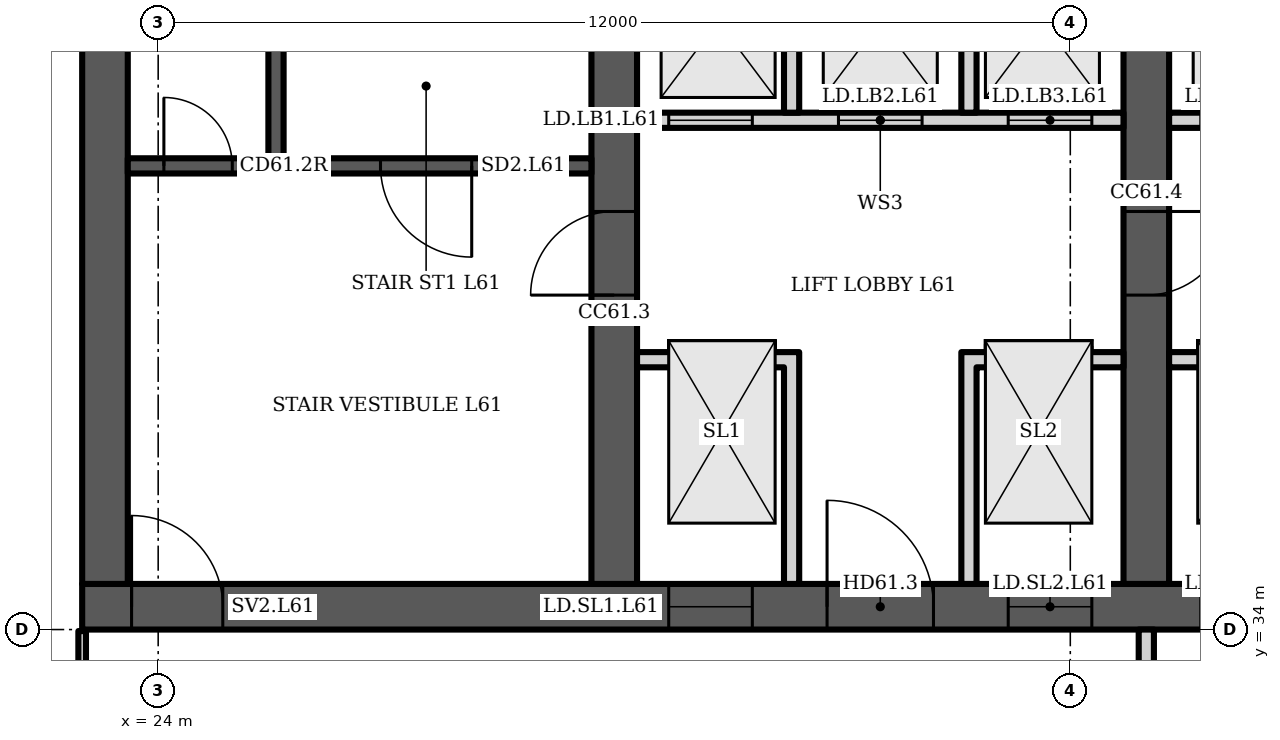
"""IFC4 building model, lengths in metres.
Left out: names, types, materials, properties, quantities, classifications, styles, units other than length and angle.
Written with IfcOpenShell. Run it as: python <this file> out.ifc"""

import sys

from ifc_helpers import new_model, si_unit, direction, frame, frame_2d, origin, place, context, subcontext, project, spatial, polyline, rectangle, outline, extrude, element, fill, save


model = new_model("IFC4")
c1 = context("Model", 3, precision=1e-05, world=origin(), true_north=direction((0.0, 1.0)))
c2 = subcontext(c1, "Body", "Model", "MODEL_VIEW")
j1 = project(units=[si_unit("LENGTHUNIT", "METRE"), si_unit("PLANEANGLEUNIT", "RADIAN")], contexts=[c1])
p1 = place(None, origin())
s1 = spatial("IfcSite", under=j1, at=p1, CompositionType="ELEMENT")
p2 = place(p1, origin())
s2 = spatial("IfcBuilding", under=s1, at=p2, CompositionType="ELEMENT")
p3 = place(p2, frame((0.0, 0.0, 243.1)))
s3 = spatial("IfcBuildingStorey", under=s2, at=p3, CompositionType="ELEMENT", Elevation=243.1)
p4 = place(p3, frame((23.0, 34.3, 0.0), z_axis=(0.0, 0.0, 1.0), x_axis=(1.0, 0.0, 0.0)))
e1 = element("IfcWall", 1, at=p4, inside=s3, PredefinedType="SHEAR", context=c2, shape_type="SweptSolid", body=[
    extrude(rectangle(XDim=35.0, YDim=0.6, at=frame_2d((17.5, 0.0))), origin(), (0.0, 0.0, 1.0), 3.6),
])
p5 = place(p4, frame((0.65, 0.0, 0.0)))
e2 = element("IfcOpeningElement", 2, at=p5, cuts=e1, PredefinedType="OPENING", context=c2, shape_type="SweptSolid", body=[
    extrude(rectangle(XDim=1.2, YDim=2.1, at=frame_2d((0.6, 1.05))), frame((0.0, 0.31, 0.0), z_axis=(0.0, -1.0, 0.0), x_axis=(1.0, 0.0, 0.0)), (0.0, 0.0, 1.0), 0.62),
])
p6 = place(p4, frame((7.717, 0.0, 0.0)))
e3 = element("IfcOpeningElement", 3, at=p6, cuts=e1, PredefinedType="OPENING", context=c2, shape_type="SweptSolid", body=[
    extrude(rectangle(XDim=1.1, YDim=2.1, at=frame_2d((0.55, 1.05))), frame((0.0, 0.31, 0.0), z_axis=(0.0, -1.0, 0.0), x_axis=(1.0, 0.0, 0.0)), (0.0, 0.0, 1.0), 0.62),
])
p7 = place(p4, frame((12.183, 0.0, 0.0)))
e4 = element("IfcOpeningElement", 4, at=p7, cuts=e1, PredefinedType="OPENING", context=c2, shape_type="SweptSolid", body=[
    extrude(rectangle(XDim=1.1, YDim=2.1, at=frame_2d((0.55, 1.05))), frame((0.0, 0.31, 0.0), z_axis=(0.0, -1.0, 0.0), x_axis=(1.0, 0.0, 0.0)), (0.0, 0.0, 1.0), 0.62),
])
p8 = place(p4, frame((9.8, 0.0, 0.0)))
e5 = element("IfcOpeningElement", 5, at=p8, cuts=e1, PredefinedType="OPENING", context=c2, shape_type="SweptSolid", body=[
    extrude(rectangle(XDim=1.4, YDim=2.1, at=frame_2d((0.7, 1.05))), frame((0.0, 0.31, 0.0), z_axis=(0.0, -1.0, 0.0), x_axis=(1.0, 0.0, 0.0)), (0.0, 0.0, 1.0), 0.62),
])
p9 = place(p4, frame((14.717, 0.0, 0.0)))
e6 = element("IfcOpeningElement", 6, at=p9, cuts=e1, PredefinedType="OPENING", context=c2, shape_type="SweptSolid", body=[
    extrude(rectangle(XDim=1.1, YDim=2.1, at=frame_2d((0.55, 1.05))), frame((0.0, 0.31, 0.0), z_axis=(0.0, -1.0, 0.0), x_axis=(1.0, 0.0, 0.0)), (0.0, 0.0, 1.0), 0.62),
])
p10 = place(p4, frame((16.95, 0.0, 0.0)))
e7 = element("IfcOpeningElement", 7, at=p10, cuts=e1, PredefinedType="OPENING", context=c2, shape_type="SweptSolid", body=[
    extrude(rectangle(XDim=1.1, YDim=2.1, at=frame_2d((0.55, 1.05))), frame((0.0, 0.31, 0.0), z_axis=(0.0, -1.0, 0.0), x_axis=(1.0, 0.0, 0.0)), (0.0, 0.0, 1.0), 0.62),
])
p11 = place(p4, frame((19.183, 0.0, 0.0)))
e8 = element("IfcOpeningElement", 8, at=p11, cuts=e1, PredefinedType="OPENING", context=c2, shape_type="SweptSolid", body=[
    extrude(rectangle(XDim=1.1, YDim=2.1, at=frame_2d((0.55, 1.05))), frame((0.0, 0.31, 0.0), z_axis=(0.0, -1.0, 0.0), x_axis=(1.0, 0.0, 0.0)), (0.0, 0.0, 1.0), 0.62),
])
p12 = place(p4, frame((26.15, 0.0, 0.0)))
e9 = element("IfcOpeningElement", 9, at=p12, cuts=e1, PredefinedType="OPENING", context=c2, shape_type="SweptSolid", body=[
    extrude(rectangle(XDim=1.2, YDim=2.1, at=frame_2d((0.6, 1.05))), frame((0.0, 0.31, 0.0), z_axis=(0.0, -1.0, 0.0), x_axis=(1.0, 0.0, 0.0)), (0.0, 0.0, 1.0), 0.62),
])
p13 = place(p4, frame((28.767, 0.0, 0.0)))
e10 = element("IfcOpeningElement", 10, at=p13, cuts=e1, PredefinedType="OPENING", context=c2, shape_type="SweptSolid", body=[
    extrude(rectangle(XDim=1.0, YDim=2.1, at=frame_2d((0.5, 1.05))), frame((0.0, 0.31, 0.0), z_axis=(0.0, -1.0, 0.0), x_axis=(1.0, 0.0, 0.0)), (0.0, 0.0, 1.0), 0.62),
])
p14 = place(p4, frame((33.083, 0.0, 0.0)))
e11 = element("IfcOpeningElement", 11, at=p14, cuts=e1, PredefinedType="OPENING", context=c2, shape_type="SweptSolid", body=[
    extrude(rectangle(XDim=1.0, YDim=2.1, at=frame_2d((0.5, 1.05))), frame((0.0, 0.31, 0.0), z_axis=(0.0, -1.0, 0.0), x_axis=(1.0, 0.0, 0.0)), (0.0, 0.0, 1.0), 0.62),
])
p15 = place(p4, frame((30.8, 0.0, 0.0)))
e12 = element("IfcOpeningElement", 12, at=p15, cuts=e1, PredefinedType="OPENING", context=c2, shape_type="SweptSolid", body=[
    extrude(rectangle(XDim=1.4, YDim=2.1, at=frame_2d((0.7, 1.05))), frame((0.0, 0.31, 0.0), z_axis=(0.0, -1.0, 0.0), x_axis=(1.0, 0.0, 0.0)), (0.0, 0.0, 1.0), 0.62),
])
p16 = place(p3, frame((23.3, 34.6, 0.0), z_axis=(0.0, 0.0, 1.0), x_axis=(0.0, 1.0, 0.0)))
e13 = element("IfcWall", 13, at=p16, inside=s3, PredefinedType="SHEAR", context=c2, shape_type="SweptSolid", body=[
    extrude(rectangle(XDim=13.585, YDim=0.6, at=frame_2d((6.792, 0.0))), origin(), (0.0, 0.0, 1.0), 3.6),
])
p17 = place(p3, frame((30.0, 34.6, 0.0), z_axis=(0.0, 0.0, 1.0), x_axis=(0.0, 1.0, 0.0)))
e14 = element("IfcWall", 14, at=p17, inside=s3, PredefinedType="SHEAR", context=c2, shape_type="SweptSolid", body=[
    extrude(rectangle(XDim=14.171, YDim=0.6, at=frame_2d((7.085, 0.0))), origin(), (0.0, 0.0, 1.0), 3.6),
])
p18 = place(p17, frame((3.8, 0.0, 0.0)))
e15 = element("IfcOpeningElement", 15, at=p18, cuts=e14, PredefinedType="OPENING", context=c2, shape_type="SweptSolid", body=[
    extrude(rectangle(XDim=1.1, YDim=2.1, at=frame_2d((0.55, 1.05))), frame((0.0, 0.31, 0.0), z_axis=(0.0, -1.0, 0.0), x_axis=(1.0, 0.0, 0.0)), (0.0, 0.0, 1.0), 0.62),
])
p19 = place(p3, frame((37.0, 34.6, 0.0), z_axis=(0.0, 0.0, 1.0), x_axis=(0.0, 1.0, 0.0)))
e16 = element("IfcWall", 16, at=p19, inside=s3, PredefinedType="SHEAR", context=c2, shape_type="SweptSolid", body=[
    extrude(rectangle(XDim=14.784, YDim=0.6, at=frame_2d((7.392, 0.0))), origin(), (0.0, 0.0, 1.0), 3.6),
])
p20 = place(p19, frame((11.302, 0.0, 0.0)))
e17 = element("IfcOpeningElement", 17, at=p20, cuts=e16, PredefinedType="OPENING", context=c2, shape_type="SweptSolid", body=[
    extrude(rectangle(XDim=1.0, YDim=2.1, at=frame_2d((0.5, 1.05))), frame((0.0, 0.31, 0.0), z_axis=(0.0, -1.0, 0.0), x_axis=(1.0, 0.0, 0.0)), (0.0, 0.0, 1.0), 0.62),
])
p21 = place(p19, frame((3.8, 0.0, 0.0)))
e18 = element("IfcOpeningElement", 18, at=p21, cuts=e16, PredefinedType="OPENING", context=c2, shape_type="SweptSolid", body=[
    extrude(rectangle(XDim=1.1, YDim=2.1, at=frame_2d((0.55, 1.05))), frame((0.0, 0.31, 0.0), z_axis=(0.0, -1.0, 0.0), x_axis=(1.0, 0.0, 0.0)), (0.0, 0.0, 1.0), 0.62),
])
p22 = place(p3, frame((23.6, 40.1, 0.0), z_axis=(0.0, 0.0, 1.0), x_axis=(1.0, 0.0, 0.0)))
e19 = element("IfcWall", 19, at=p22, inside=s3, PredefinedType="SHEAR", context=c2, shape_type="SweptSolid", body=[
    extrude(rectangle(XDim=6.1, YDim=0.2, at=frame_2d((3.05, 0.0))), origin(), (0.0, 0.0, 1.0), 3.2),
])
p23 = place(p22, frame((3.325, 0.0, 0.0)))
e20 = element("IfcOpeningElement", 20, at=p23, cuts=e19, PredefinedType="OPENING", context=c2, shape_type="SweptSolid", body=[
    extrude(rectangle(XDim=1.2, YDim=2.1, at=frame_2d((0.6, 1.05))), frame((0.0, 0.11, 0.0), z_axis=(0.0, -1.0, 0.0), x_axis=(1.0, 0.0, 0.0)), (0.0, 0.0, 1.0), 0.22),
])
p24 = place(p22, frame((0.475, 0.0, 0.0)))
e21 = element("IfcOpeningElement", 21, at=p24, cuts=e19, PredefinedType="OPENING", context=c2, shape_type="SweptSolid", body=[
    extrude(rectangle(XDim=0.9, YDim=2.1, at=frame_2d((0.45, 1.05))), frame((0.0, 0.11, 0.0), z_axis=(0.0, -1.0, 0.0), x_axis=(1.0, 0.0, 0.0)), (0.0, 0.0, 1.0), 0.22),
])
p25 = place(p3, frame((25.55, 40.2, 0.0), z_axis=(0.0, 0.0, 1.0), x_axis=(0.0, 1.0, 0.0)))
e22 = element("IfcWall", 22, at=p25, inside=s3, PredefinedType="SHEAR", context=c2, shape_type="SweptSolid", body=[
    extrude(rectangle(XDim=7.2, YDim=0.2, at=frame_2d((3.6, 0.0))), origin(), (0.0, 0.0, 1.0), 3.2),
])
p26 = place(p3, frame((30.3, 40.7, 0.0), z_axis=(0.0, 0.0, 1.0), x_axis=(1.0, 0.0, 0.0)))
e23 = element("IfcWall", 23, at=p26, inside=s3, PredefinedType="PARTITIONING", context=c2, shape_type="SweptSolid", body=[
    extrude(rectangle(XDim=6.4, YDim=0.2, at=frame_2d((3.2, 0.0))), origin(), (0.0, 0.0, 1.0), 3.2),
])
p27 = place(p26, frame((0.417, 0.0, 0.0)))
e24 = element("IfcOpeningElement", 24, at=p27, cuts=e23, PredefinedType="OPENING", context=c2, shape_type="SweptSolid", body=[
    extrude(rectangle(XDim=1.1, YDim=2.1, at=frame_2d((0.55, 1.05))), frame((0.0, 0.11, 0.0), z_axis=(0.0, -1.0, 0.0), x_axis=(1.0, 0.0, 0.0)), (0.0, 0.0, 1.0), 0.22),
])
p28 = place(p26, frame((2.65, 0.0, 0.0)))
e25 = element("IfcOpeningElement", 25, at=p28, cuts=e23, PredefinedType="OPENING", context=c2, shape_type="SweptSolid", body=[
    extrude(rectangle(XDim=1.1, YDim=2.1, at=frame_2d((0.55, 1.05))), frame((0.0, 0.11, 0.0), z_axis=(0.0, -1.0, 0.0), x_axis=(1.0, 0.0, 0.0)), (0.0, 0.0, 1.0), 0.22),
])
p29 = place(p26, frame((4.883, 0.0, 0.0)))
e26 = element("IfcOpeningElement", 26, at=p29, cuts=e23, PredefinedType="OPENING", context=c2, shape_type="SweptSolid", body=[
    extrude(rectangle(XDim=1.1, YDim=2.1, at=frame_2d((0.55, 1.05))), frame((0.0, 0.11, 0.0), z_axis=(0.0, -1.0, 0.0), x_axis=(1.0, 0.0, 0.0)), (0.0, 0.0, 1.0), 0.22),
])
p30 = place(p3, frame((0.0, 0.0, -0.0)))
e27 = element("IfcWall", 27, at=p30, inside=s3, PredefinedType="PARTITIONING", context=c2, shape_type="SweptSolid", body=[
    extrude(outline(polyline([(32.233, 37.45), (30.3, 37.45), (30.3, 37.65), (32.233, 37.65), (32.433, 37.65), (32.433, 34.6), (32.233, 34.6), (32.233, 37.45)])), origin(), (0.0, 0.0, 1.0), 3.2),
])
p31 = place(p3, frame((0.0, 0.0, -0.0)))
e28 = element("IfcWall", 28, at=p31, inside=s3, PredefinedType="PARTITIONING", context=c2, shape_type="SweptSolid", body=[
    extrude(outline(polyline([(34.567, 37.65), (34.767, 37.65), (36.7, 37.65), (36.7, 37.45), (34.767, 37.45), (34.767, 34.6), (34.567, 34.6), (34.567, 37.65)])), origin(), (0.0, 0.0, 1.0), 3.2),
])
p32 = place(p3, frame((0.0, 0.0, -0.0)))
e29 = element("IfcWall", 29, at=p32, inside=s3, PredefinedType="PARTITIONING", context=c2, shape_type="SweptSolid", body=[
    extrude(outline(polyline([(32.433, 40.8), (32.233, 40.8), (32.233, 43.8), (30.3, 43.8), (30.3, 44.0), (36.7, 44.0), (36.7, 43.8), (34.767, 43.8), (34.767, 40.8), (34.567, 40.8), (34.567, 43.8), (32.433, 43.8), (32.433, 40.8)])), origin(), (0.0, 0.0, 1.0), 3.2),
])
p33 = place(p3, frame((37.3, 40.7, 0.0), z_axis=(0.0, 0.0, 1.0), x_axis=(1.0, 0.0, 0.0)))
e30 = element("IfcWall", 30, at=p33, inside=s3, PredefinedType="PARTITIONING", context=c2, shape_type="SweptSolid", body=[
    extrude(rectangle(XDim=6.4, YDim=0.2, at=frame_2d((3.2, 0.0))), origin(), (0.0, 0.0, 1.0), 3.2),
])
p34 = place(p33, frame((0.417, 0.0, 0.0)))
e31 = element("IfcOpeningElement", 31, at=p34, cuts=e30, PredefinedType="OPENING", context=c2, shape_type="SweptSolid", body=[
    extrude(rectangle(XDim=1.1, YDim=2.1, at=frame_2d((0.55, 1.05))), frame((0.0, 0.11, 0.0), z_axis=(0.0, -1.0, 0.0), x_axis=(1.0, 0.0, 0.0)), (0.0, 0.0, 1.0), 0.22),
])
p35 = place(p33, frame((2.65, 0.0, 0.0)))
e32 = element("IfcOpeningElement", 32, at=p35, cuts=e30, PredefinedType="OPENING", context=c2, shape_type="SweptSolid", body=[
    extrude(rectangle(XDim=1.1, YDim=2.1, at=frame_2d((0.55, 1.05))), frame((0.0, 0.11, 0.0), z_axis=(0.0, -1.0, 0.0), x_axis=(1.0, 0.0, 0.0)), (0.0, 0.0, 1.0), 0.22),
])
p36 = place(p33, frame((4.883, 0.0, 0.0)))
e33 = element("IfcOpeningElement", 33, at=p36, cuts=e30, PredefinedType="OPENING", context=c2, shape_type="SweptSolid", body=[
    extrude(rectangle(XDim=1.1, YDim=2.1, at=frame_2d((0.55, 1.05))), frame((0.0, 0.11, 0.0), z_axis=(0.0, -1.0, 0.0), x_axis=(1.0, 0.0, 0.0)), (0.0, 0.0, 1.0), 0.22),
])
p37 = place(p3, frame((0.0, 0.0, -0.0)))
e34 = element("IfcWall", 34, at=p37, inside=s3, PredefinedType="PARTITIONING", context=c2, shape_type="SweptSolid", body=[
    extrude(outline(polyline([(41.567, 37.1), (39.433, 37.1), (39.433, 34.6), (39.233, 34.6), (39.233, 37.45), (37.3, 37.45), (37.3, 37.65), (39.233, 37.65), (39.433, 37.65), (39.433, 37.3), (41.567, 37.3), (41.567, 37.35), (41.767, 37.35), (43.7, 37.35), (43.7, 37.15), (41.767, 37.15), (41.767, 34.6), (41.567, 34.6), (41.567, 37.1)])), origin(), (0.0, 0.0, 1.0), 3.2),
])
p38 = place(p3, frame((0.0, 0.0, -0.0)))
e35 = element("IfcWall", 35, at=p38, inside=s3, PredefinedType="PARTITIONING", context=c2, shape_type="SweptSolid", body=[
    extrude(outline(polyline([(39.433, 40.8), (39.233, 40.8), (39.233, 43.8), (37.3, 43.8), (37.3, 44.0), (43.7, 44.0), (43.7, 43.8), (41.767, 43.8), (41.767, 40.8), (41.567, 40.8), (41.567, 43.8), (39.433, 43.8), (39.433, 40.8)])), origin(), (0.0, 0.0, 1.0), 3.2),
])
p39 = place(p3, frame((37.0, 30.5, 0.0), z_axis=(0.0, 0.0, 1.0), x_axis=(0.0, 1.0, 0.0)))
e36 = element("IfcWall", 36, at=p39, inside=s3, PredefinedType="PARTITIONING", context=c2, shape_type="SweptSolid", body=[
    extrude(rectangle(XDim=3.5, YDim=0.2, at=frame_2d((1.75, 0.0))), origin(), (0.0, 0.0, 1.0), 3.2),
])
p40 = place(p39, frame((1.2, 0.0, 0.0)))
e37 = element("IfcOpeningElement", 37, at=p40, cuts=e36, PredefinedType="OPENING", context=c2, shape_type="SweptSolid", body=[
    extrude(rectangle(XDim=1.1, YDim=2.1, at=frame_2d((0.55, 1.05))), frame((0.0, 0.11, 0.0), z_axis=(0.0, -1.0, 0.0), x_axis=(1.0, 0.0, 0.0)), (0.0, 0.0, 1.0), 0.22),
])
p41 = place(p3, frame((23.0, 30.5, 0.0), z_axis=(0.0, 0.0, 1.0), x_axis=(0.0, 1.0, 0.0)))
e38 = element("IfcWall", 38, at=p41, inside=s3, PredefinedType="PARTITIONING", context=c2, shape_type="SweptSolid", body=[
    extrude(rectangle(XDim=3.48, YDim=0.1, at=frame_2d((1.74, 0.0))), origin(), (0.0, 0.0, 1.0), 3.2),
])
p42 = place(p23, origin())
e39 = element("IfcDoor", 39, at=p42, inside=s3, OperationType="SINGLE_SWING_RIGHT", PredefinedType="DOOR", context=c2, shape_type="SweptSolid", body=[
    extrude(rectangle(XDim=1.2, YDim=2.1, at=frame_2d((0.6, 1.05))), frame((0.0, 0.025, 0.0), z_axis=(0.0, -1.0, 0.0), x_axis=(1.0, 0.0, 0.0)), (0.0, 0.0, 1.0), 0.05),
])
fill(e20, e39)
p43 = place(p24, origin())
e40 = element("IfcDoor", 40, at=p43, inside=s3, OperationType="SINGLE_SWING_LEFT", PredefinedType="DOOR", context=c2, shape_type="SweptSolid", body=[
    extrude(rectangle(XDim=0.9, YDim=2.1, at=frame_2d((0.45, 1.05))), frame((0.0, 0.025, 0.0), z_axis=(0.0, -1.0, 0.0), x_axis=(1.0, 0.0, 0.0)), (0.0, 0.0, 1.0), 0.05),
])
fill(e21, e40)
p44 = place(p5, origin())
e41 = element("IfcDoor", 41, at=p44, inside=s3, OperationType="SINGLE_SWING_LEFT", PredefinedType="DOOR", context=c2, shape_type="SweptSolid", body=[
    extrude(rectangle(XDim=1.2, YDim=2.1, at=frame_2d((0.6, 1.05))), frame((0.0, 0.025, 0.0), z_axis=(0.0, -1.0, 0.0), x_axis=(1.0, 0.0, 0.0)), (0.0, 0.0, 1.0), 0.05),
])
fill(e2, e41)
p45 = place(p6, origin())
e42 = element("IfcDoor", 42, at=p45, inside=s3, OperationType="DOUBLE_DOOR_SLIDING", PredefinedType="DOOR", context=c2, shape_type="SweptSolid", body=[
    extrude(rectangle(XDim=1.1, YDim=2.1, at=frame_2d((0.55, 1.05))), frame((0.0, 0.025, 0.0), z_axis=(0.0, -1.0, 0.0), x_axis=(1.0, 0.0, 0.0)), (0.0, 0.0, 1.0), 0.05),
])
fill(e3, e42)
p46 = place(p7, origin())
e43 = element("IfcDoor", 43, at=p46, inside=s3, OperationType="DOUBLE_DOOR_SLIDING", PredefinedType="DOOR", context=c2, shape_type="SweptSolid", body=[
    extrude(rectangle(XDim=1.1, YDim=2.1, at=frame_2d((0.55, 1.05))), frame((0.0, 0.025, 0.0), z_axis=(0.0, -1.0, 0.0), x_axis=(1.0, 0.0, 0.0)), (0.0, 0.0, 1.0), 0.05),
])
fill(e4, e43)
p47 = place(p8, origin())
e44 = element("IfcDoor", 44, at=p47, inside=s3, OperationType="DOUBLE_DOOR_SINGLE_SWING", PredefinedType="DOOR", context=c2, shape_type="SweptSolid", body=[
    extrude(rectangle(XDim=1.4, YDim=2.1, at=frame_2d((0.7, 1.05))), frame((0.0, 0.025, 0.0), z_axis=(0.0, -1.0, 0.0), x_axis=(1.0, 0.0, 0.0)), (0.0, 0.0, 1.0), 0.05),
])
fill(e5, e44)
p48 = place(p27, origin())
e45 = element("IfcDoor", 45, at=p48, inside=s3, OperationType="DOUBLE_DOOR_SLIDING", PredefinedType="DOOR", context=c2, shape_type="SweptSolid", body=[
    extrude(rectangle(XDim=1.1, YDim=2.1, at=frame_2d((0.55, 1.05))), frame((0.0, 0.025, 0.0), z_axis=(0.0, -1.0, 0.0), x_axis=(1.0, 0.0, 0.0)), (0.0, 0.0, 1.0), 0.05),
])
fill(e24, e45)
p49 = place(p28, origin())
e46 = element("IfcDoor", 46, at=p49, inside=s3, OperationType="DOUBLE_DOOR_SLIDING", PredefinedType="DOOR", context=c2, shape_type="SweptSolid", body=[
    extrude(rectangle(XDim=1.1, YDim=2.1, at=frame_2d((0.55, 1.05))), frame((0.0, 0.025, 0.0), z_axis=(0.0, -1.0, 0.0), x_axis=(1.0, 0.0, 0.0)), (0.0, 0.0, 1.0), 0.05),
])
fill(e25, e46)
p50 = place(p29, origin())
e47 = element("IfcDoor", 47, at=p50, inside=s3, OperationType="DOUBLE_DOOR_SLIDING", PredefinedType="DOOR", context=c2, shape_type="SweptSolid", body=[
    extrude(rectangle(XDim=1.1, YDim=2.1, at=frame_2d((0.55, 1.05))), frame((0.0, 0.025, 0.0), z_axis=(0.0, -1.0, 0.0), x_axis=(1.0, 0.0, 0.0)), (0.0, 0.0, 1.0), 0.05),
])
fill(e26, e47)
p51 = place(p18, origin())
e48 = element("IfcDoor", 48, at=p51, inside=s3, OperationType="SINGLE_SWING_LEFT", PredefinedType="DOOR", context=c2, shape_type="SweptSolid", body=[
    extrude(rectangle(XDim=1.1, YDim=2.1, at=frame_2d((0.55, 1.05))), frame((0.0, 0.025, 0.0), z_axis=(0.0, -1.0, 0.0), x_axis=(1.0, 0.0, 0.0)), (0.0, 0.0, 1.0), 0.05),
])
fill(e15, e48)
p52 = place(p21, origin())
e49 = element("IfcDoor", 49, at=p52, inside=s3, OperationType="SINGLE_SWING_RIGHT", PredefinedType="DOOR", context=c2, shape_type="SweptSolid", body=[
    extrude(rectangle(XDim=1.1, YDim=2.1, at=frame_2d((0.55, 1.05))), frame((0.0, 0.025, 0.0), z_axis=(0.0, -1.0, 0.0), x_axis=(1.0, 0.0, 0.0)), (0.0, 0.0, 1.0), 0.05),
])
fill(e18, e49)
save(model, sys.argv[1])
